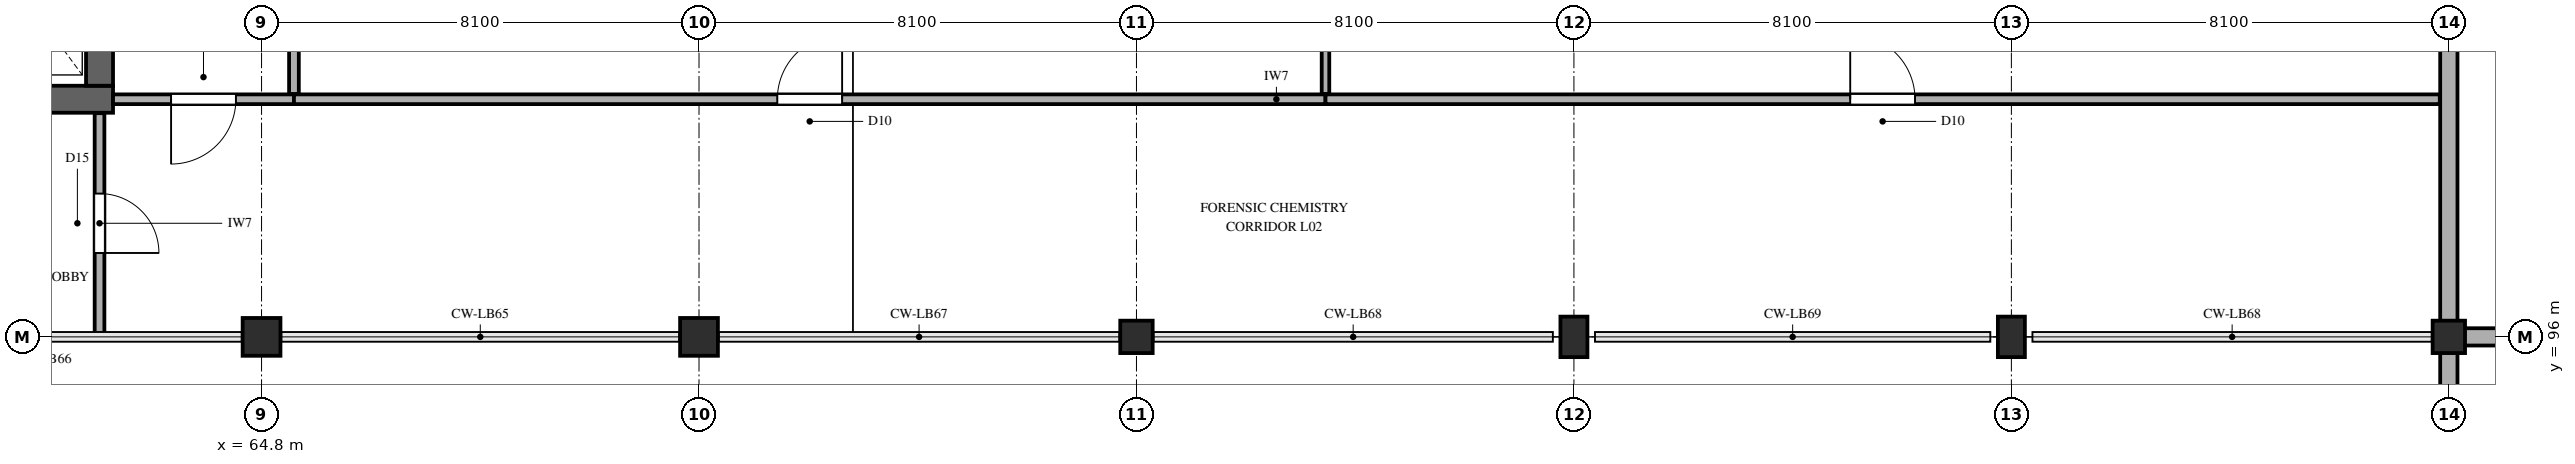
"""IFC4 building model, lengths in metres.
Left out: names, types, materials, properties, quantities, classifications, styles, units other than length and angle.
Written with IfcOpenShell. Run it as: python <this file> out.ifc"""

import sys

from ifc_helpers import new_model, si_unit, direction, frame, frame_2d, origin, origin_2d, place, context, subcontext, project, spatial, rectangle, extrude, element, fill, save


model = new_model("IFC4")
c1 = context("Model", 3, precision=1e-05, world=origin(), true_north=direction((0.0, 1.0)))
c2 = subcontext(c1, "Body", "Model", "MODEL_VIEW")
j1 = project(units=[si_unit("LENGTHUNIT", "METRE"), si_unit("PLANEANGLEUNIT", "RADIAN")], contexts=[c1])
p1 = place(None, origin())
s1 = spatial("IfcSite", under=j1, at=p1, CompositionType="ELEMENT")
p2 = place(p1, origin())
s2 = spatial("IfcBuilding", under=s1, at=p2, CompositionType="ELEMENT")
p3 = place(p2, frame((0.0, 0.0, 10.2)))
s3 = spatial("IfcBuildingStorey", under=s2, at=p3, CompositionType="ELEMENT", Elevation=10.2)
p4 = place(p3, frame((46.75, 100.4, 0.0), z_axis=(0.0, 0.0, 1.0), x_axis=(1.0, 0.0, 0.0)))
e1 = element("IfcWall", 1, at=p4, inside=s3, PredefinedType="SHEAR", context=c2, shape_type="SweptSolid", body=[
    extrude(rectangle(XDim=15.3, YDim=0.5, at=frame_2d((7.65, 0.0))), origin(), (0.0, 0.0, 1.0), 4.5),
])
p5 = place(p4, frame((1.0, 0.0, 0.0)))
e2 = element("IfcOpeningElement", 2, at=p5, cuts=e1, PredefinedType="OPENING", context=c2, shape_type="SweptSolid", body=[
    extrude(rectangle(XDim=1.15, YDim=2.25, at=frame_2d((0.575, 1.125))), frame((0.0, 0.26, 0.0), z_axis=(0.0, -1.0, 0.0), x_axis=(1.0, 0.0, 0.0)), (0.0, 0.0, 1.0), 0.52),
])
p6 = place(p4, frame((10.282, 0.0, 0.0)))
e3 = element("IfcOpeningElement", 3, at=p6, cuts=e1, PredefinedType="OPENING", context=c2, shape_type="SweptSolid", body=[
    extrude(rectangle(XDim=1.1, YDim=2.2, at=frame_2d((0.55, 1.1))), frame((0.0, 0.26, 0.0), z_axis=(0.0, -1.0, 0.0), x_axis=(1.0, 0.0, 0.0)), (0.0, 0.0, 1.0), 0.52),
])
p7 = place(p4, frame((12.998, 0.0, 0.0)))
e4 = element("IfcOpeningElement", 4, at=p7, cuts=e1, PredefinedType="OPENING", context=c2, shape_type="SweptSolid", body=[
    extrude(rectangle(XDim=1.1, YDim=2.2, at=frame_2d((0.55, 1.1))), frame((0.0, 0.26, 0.0), z_axis=(0.0, -1.0, 0.0), x_axis=(1.0, 0.0, 0.0)), (0.0, 0.0, 1.0), 0.52),
])
p8 = place(p3, frame((61.8, 100.65, 0.0), z_axis=(0.0, 0.0, 1.0), x_axis=(0.0, 1.0, 0.0)))
e5 = element("IfcWall", 5, at=p8, inside=s3, PredefinedType="SHEAR", context=c2, shape_type="SweptSolid", body=[
    extrude(rectangle(XDim=7.9, YDim=0.5, at=frame_2d((3.95, 0.0))), origin(), (0.0, 0.0, 1.0), 4.5),
])
for number, where, z_axis, x_axis in (
    (6, (64.8, 96.0, 0.0), (0.0, 0.0, 1.0), (1.0, 0.0, 0.0)),
    (7, (72.9, 96.0, 0.0), (0.0, 0.0, 1.0), (1.0, 0.0, 0.0)),
):
    element("IfcColumn", number, at=place(p3, frame(where, z_axis=z_axis, x_axis=x_axis)), inside=s3, PredefinedType="COLUMN", context=c2, shape_type="SweptSolid", body=[
        extrude(rectangle(XDim=0.7, YDim=0.7, at=origin_2d()), origin(), (0.0, 0.0, 1.0), 4.5),
    ])
p9 = place(p3, frame((81.0, 96.0, 0.0), z_axis=(0.0, 0.0, 1.0), x_axis=(1.0, 0.0, 0.0)))
e8 = element("IfcColumn", 8, at=p9, inside=s3, PredefinedType="COLUMN", context=c2, shape_type="SweptSolid", body=[
    extrude(rectangle(XDim=0.6, YDim=0.6, at=origin_2d()), origin(), (0.0, 0.0, 1.0), 4.5),
])
for number, where, z_axis, x_axis in (
    (9, (89.1, 96.0, 0.0), (0.0, 0.0, 1.0), (1.0, 0.0, 0.0)),
    (10, (97.2, 96.0, 0.0), (0.0, 0.0, 1.0), (1.0, 0.0, 0.0)),
):
    element("IfcColumn", number, at=place(p3, frame(where, z_axis=z_axis, x_axis=x_axis)), inside=s3, PredefinedType="COLUMN", context=c2, shape_type="SweptSolid", body=[
        extrude(rectangle(XDim=0.5, YDim=0.75, at=origin_2d()), origin(), (0.0, 0.0, 1.0), 4.5),
    ])
p10 = place(p3, frame((105.3, 96.0, 0.0), z_axis=(0.0, 0.0, 1.0), x_axis=(1.0, 0.0, 0.0)))
e11 = element("IfcColumn", 11, at=p10, inside=s3, PredefinedType="COLUMN", context=c2, shape_type="SweptSolid", body=[
    extrude(rectangle(XDim=0.6, YDim=0.6, at=origin_2d()), origin(), (0.0, 0.0, 1.0), 4.5),
])
p11 = place(p3, frame((117.54, 96.0, 0.0), z_axis=(0.0, 0.0, 1.0), x_axis=(-1.0, 0.0, 0.0)))
e12 = element("IfcWall", 12, at=p11, inside=s3, PredefinedType="SOLIDWALL", context=c2, shape_type="SweptSolid", body=[
    extrude(rectangle(XDim=12.06, YDim=0.32, at=frame_2d((6.03, 0.0))), origin(), (0.0, 0.0, 1.0), 3.544),
])
p12 = place(p11, frame((6.3, 0.0, 0.95)))
e13 = element("IfcOpeningElement", 13, at=p12, cuts=e12, PredefinedType="OPENING", context=c2, shape_type="SweptSolid", body=[
    extrude(rectangle(XDim=3.6, YDim=0.9, at=frame_2d((1.8, 0.45))), frame((0.0, 0.17, 0.0), z_axis=(0.0, -1.0, 0.0), x_axis=(1.0, 0.0, 0.0)), (0.0, 0.0, 1.0), 0.34),
])
p13 = place(p3, frame((105.3, 96.18, 0.0), z_axis=(0.0, 0.0, 1.0), x_axis=(0.0, 1.0, 0.0)))
e14 = element("IfcWall", 14, at=p13, inside=s3, PredefinedType="SOLIDWALL", context=c2, shape_type="SweptSolid", body=[
    extrude(rectangle(XDim=15.82, YDim=0.32, at=frame_2d((7.91, 0.0))), origin(), (0.0, 0.0, 1.0), 3.732),
])
p14 = place(p13, frame((9.45, 0.0, 0.95)))
e15 = element("IfcOpeningElement", 15, at=p14, cuts=e14, PredefinedType="OPENING", context=c2, shape_type="SweptSolid", body=[
    extrude(rectangle(XDim=1.6, YDim=1.4, at=frame_2d((0.8, 0.7))), frame((0.0, 0.17, 0.0), z_axis=(0.0, -1.0, 0.0), x_axis=(1.0, 0.0, 0.0)), (0.0, 0.0, 1.0), 0.34),
])
p15 = place(p3, frame((105.3, 95.82, 0.0), z_axis=(0.0, 0.0, 1.0), x_axis=(0.0, -1.0, 0.0)))
e16 = element("IfcWall", 16, at=p15, inside=s3, PredefinedType="SOLIDWALL", context=c2, shape_type="SweptSolid", body=[
    extrude(rectangle(XDim=15.82, YDim=0.32, at=frame_2d((7.91, 0.0))), origin(), (0.0, 0.0, 1.0), 3.769),
])
p16 = place(p3, frame((62.05, 100.4, 0.0), z_axis=(0.0, 0.0, 1.0), x_axis=(1.0, 0.0, 0.0)))
e17 = element("IfcWall", 17, at=p16, inside=s3, PredefinedType="PARTITIONING", context=c2, shape_type="SweptSolid", body=[
    extrude(rectangle(XDim=3.35, YDim=0.18, at=frame_2d((1.675, 0.0))), origin(), (0.0, 0.0, 1.0), 4.24),
])
p17 = place(p16, frame((1.075, 0.0, 0.0)))
e18 = element("IfcOpeningElement", 18, at=p17, cuts=e17, PredefinedType="OPENING", context=c2, shape_type="SweptSolid", body=[
    extrude(rectangle(XDim=1.2, YDim=2.2, at=frame_2d((0.6, 1.1))), frame((0.0, 0.1, 0.0), z_axis=(0.0, -1.0, 0.0), x_axis=(1.0, 0.0, 0.0)), (0.0, 0.0, 1.0), 0.2),
])
p18 = place(p3, frame((65.4, 100.4, 0.0), z_axis=(0.0, 0.0, 1.0), x_axis=(1.0, 0.0, 0.0)))
e19 = element("IfcWall", 19, at=p18, inside=s3, PredefinedType="PARTITIONING", context=c2, shape_type="SweptSolid", body=[
    extrude(rectangle(XDim=19.1, YDim=0.18, at=frame_2d((9.55, 0.0))), origin(), (0.0, 0.0, 1.0), 4.24),
])
p19 = place(p18, frame((8.95, 0.0, 0.0)))
e20 = element("IfcOpeningElement", 20, at=p19, cuts=e19, PredefinedType="OPENING", context=c2, shape_type="SweptSolid", body=[
    extrude(rectangle(XDim=1.2, YDim=2.3, at=frame_2d((0.6, 1.15))), frame((0.0, 0.1, 0.0), z_axis=(0.0, -1.0, 0.0), x_axis=(1.0, 0.0, 0.0)), (0.0, 0.0, 1.0), 0.2),
])
p20 = place(p3, frame((84.5, 100.4, 0.0), z_axis=(0.0, 0.0, 1.0), x_axis=(1.0, 0.0, 0.0)))
e21 = element("IfcWall", 21, at=p20, inside=s3, PredefinedType="PARTITIONING", context=c2, shape_type="SweptSolid", body=[
    extrude(rectangle(XDim=20.632, YDim=0.18, at=frame_2d((10.316, 0.0))), origin(), (0.0, 0.0, 1.0), 4.24),
])
p21 = place(p20, frame((9.716, 0.0, 0.0)))
e22 = element("IfcOpeningElement", 22, at=p21, cuts=e21, PredefinedType="OPENING", context=c2, shape_type="SweptSolid", body=[
    extrude(rectangle(XDim=1.2, YDim=2.3, at=frame_2d((0.6, 1.15))), frame((0.0, 0.1, 0.0), z_axis=(0.0, -1.0, 0.0), x_axis=(1.0, 0.0, 0.0)), (0.0, 0.0, 1.0), 0.2),
])
p22 = place(p3, frame((61.8, 96.065, 0.0), z_axis=(0.0, 0.0, 1.0), x_axis=(0.0, 1.0, 0.0)))
e23 = element("IfcWall", 23, at=p22, inside=s3, PredefinedType="PARTITIONING", context=c2, shape_type="SweptSolid", body=[
    extrude(rectangle(XDim=4.077, YDim=0.18, at=frame_2d((2.039, 0.0))), origin(), (0.0, 0.0, 1.0), 4.24),
])
p23 = place(p22, frame((1.489, 0.0, 0.0)))
e24 = element("IfcOpeningElement", 24, at=p23, cuts=e23, PredefinedType="OPENING", context=c2, shape_type="SweptSolid", body=[
    extrude(rectangle(XDim=1.1, YDim=2.2, at=frame_2d((0.55, 1.1))), frame((0.0, 0.1, 0.0), z_axis=(0.0, -1.0, 0.0), x_axis=(1.0, 0.0, 0.0)), (0.0, 0.0, 1.0), 0.2),
])
p24 = place(p3, frame((65.4, 100.498, 0.0), z_axis=(0.0, 0.0, 1.0), x_axis=(0.0, 1.0, 0.0)))
e25 = element("IfcWall", 25, at=p24, inside=s3, PredefinedType="PARTITIONING", context=c2, shape_type="SweptSolid", body=[
    extrude(rectangle(XDim=5.667, YDim=0.18, at=frame_2d((2.833, 0.0))), origin(), (0.0, 0.0, 1.0), 4.24),
])
p25 = place(p3, frame((84.5, 100.498, 0.0), z_axis=(0.0, 0.0, 1.0), x_axis=(0.0, 1.0, 0.0)))
e26 = element("IfcWall", 26, at=p25, inside=s3, PredefinedType="PARTITIONING", context=c2, shape_type="SweptSolid", body=[
    extrude(rectangle(XDim=5.667, YDim=0.14, at=frame_2d((2.833, 0.0))), origin(), (0.0, 0.0, 1.0), 4.24),
])
p26 = place(p17, frame((1.2, 0.0, 0.0), z_axis=(0.0, 0.0, 1.0), x_axis=(-1.0, 0.0, 0.0)))
e27 = element("IfcDoor", 27, at=p26, inside=s3, OperationType="SINGLE_SWING_LEFT", PredefinedType="DOOR", context=c2, shape_type="SweptSolid", body=[
    extrude(rectangle(XDim=1.2, YDim=2.2, at=frame_2d((0.6, 1.1))), frame((0.0, 0.025, 0.0), z_axis=(0.0, -1.0, 0.0), x_axis=(1.0, 0.0, 0.0)), (0.0, 0.0, 1.0), 0.05),
])
fill(e18, e27)
p27 = place(p19, origin())
e28 = element("IfcDoor", 28, at=p27, inside=s3, OperationType="SINGLE_SWING_RIGHT", PredefinedType="DOOR", context=c2, shape_type="SweptSolid", body=[
    extrude(rectangle(XDim=1.2, YDim=2.3, at=frame_2d((0.6, 1.15))), frame((0.0, 0.025, 0.0), z_axis=(0.0, -1.0, 0.0), x_axis=(1.0, 0.0, 0.0)), (0.0, 0.0, 1.0), 0.05),
])
fill(e20, e28)
p28 = place(p21, origin())
e29 = element("IfcDoor", 29, at=p28, inside=s3, OperationType="SINGLE_SWING_LEFT", PredefinedType="DOOR", context=c2, shape_type="SweptSolid", body=[
    extrude(rectangle(XDim=1.2, YDim=2.3, at=frame_2d((0.6, 1.15))), frame((0.0, 0.025, 0.0), z_axis=(0.0, -1.0, 0.0), x_axis=(1.0, 0.0, 0.0)), (0.0, 0.0, 1.0), 0.05),
])
fill(e22, e29)
p29 = place(p23, frame((1.1, 0.0, 0.0), z_axis=(0.0, 0.0, 1.0), x_axis=(-1.0, 0.0, 0.0)))
e30 = element("IfcDoor", 30, at=p29, inside=s3, OperationType="SINGLE_SWING_LEFT", PredefinedType="DOOR", context=c2, shape_type="SweptSolid", body=[
    extrude(rectangle(XDim=1.1, YDim=2.2, at=frame_2d((0.55, 1.1))), frame((0.0, 0.025, 0.0), z_axis=(0.0, -1.0, 0.0), x_axis=(1.0, 0.0, 0.0)), (0.0, 0.0, 1.0), 0.05),
])
fill(e24, e30)
save(model, sys.argv[1])
